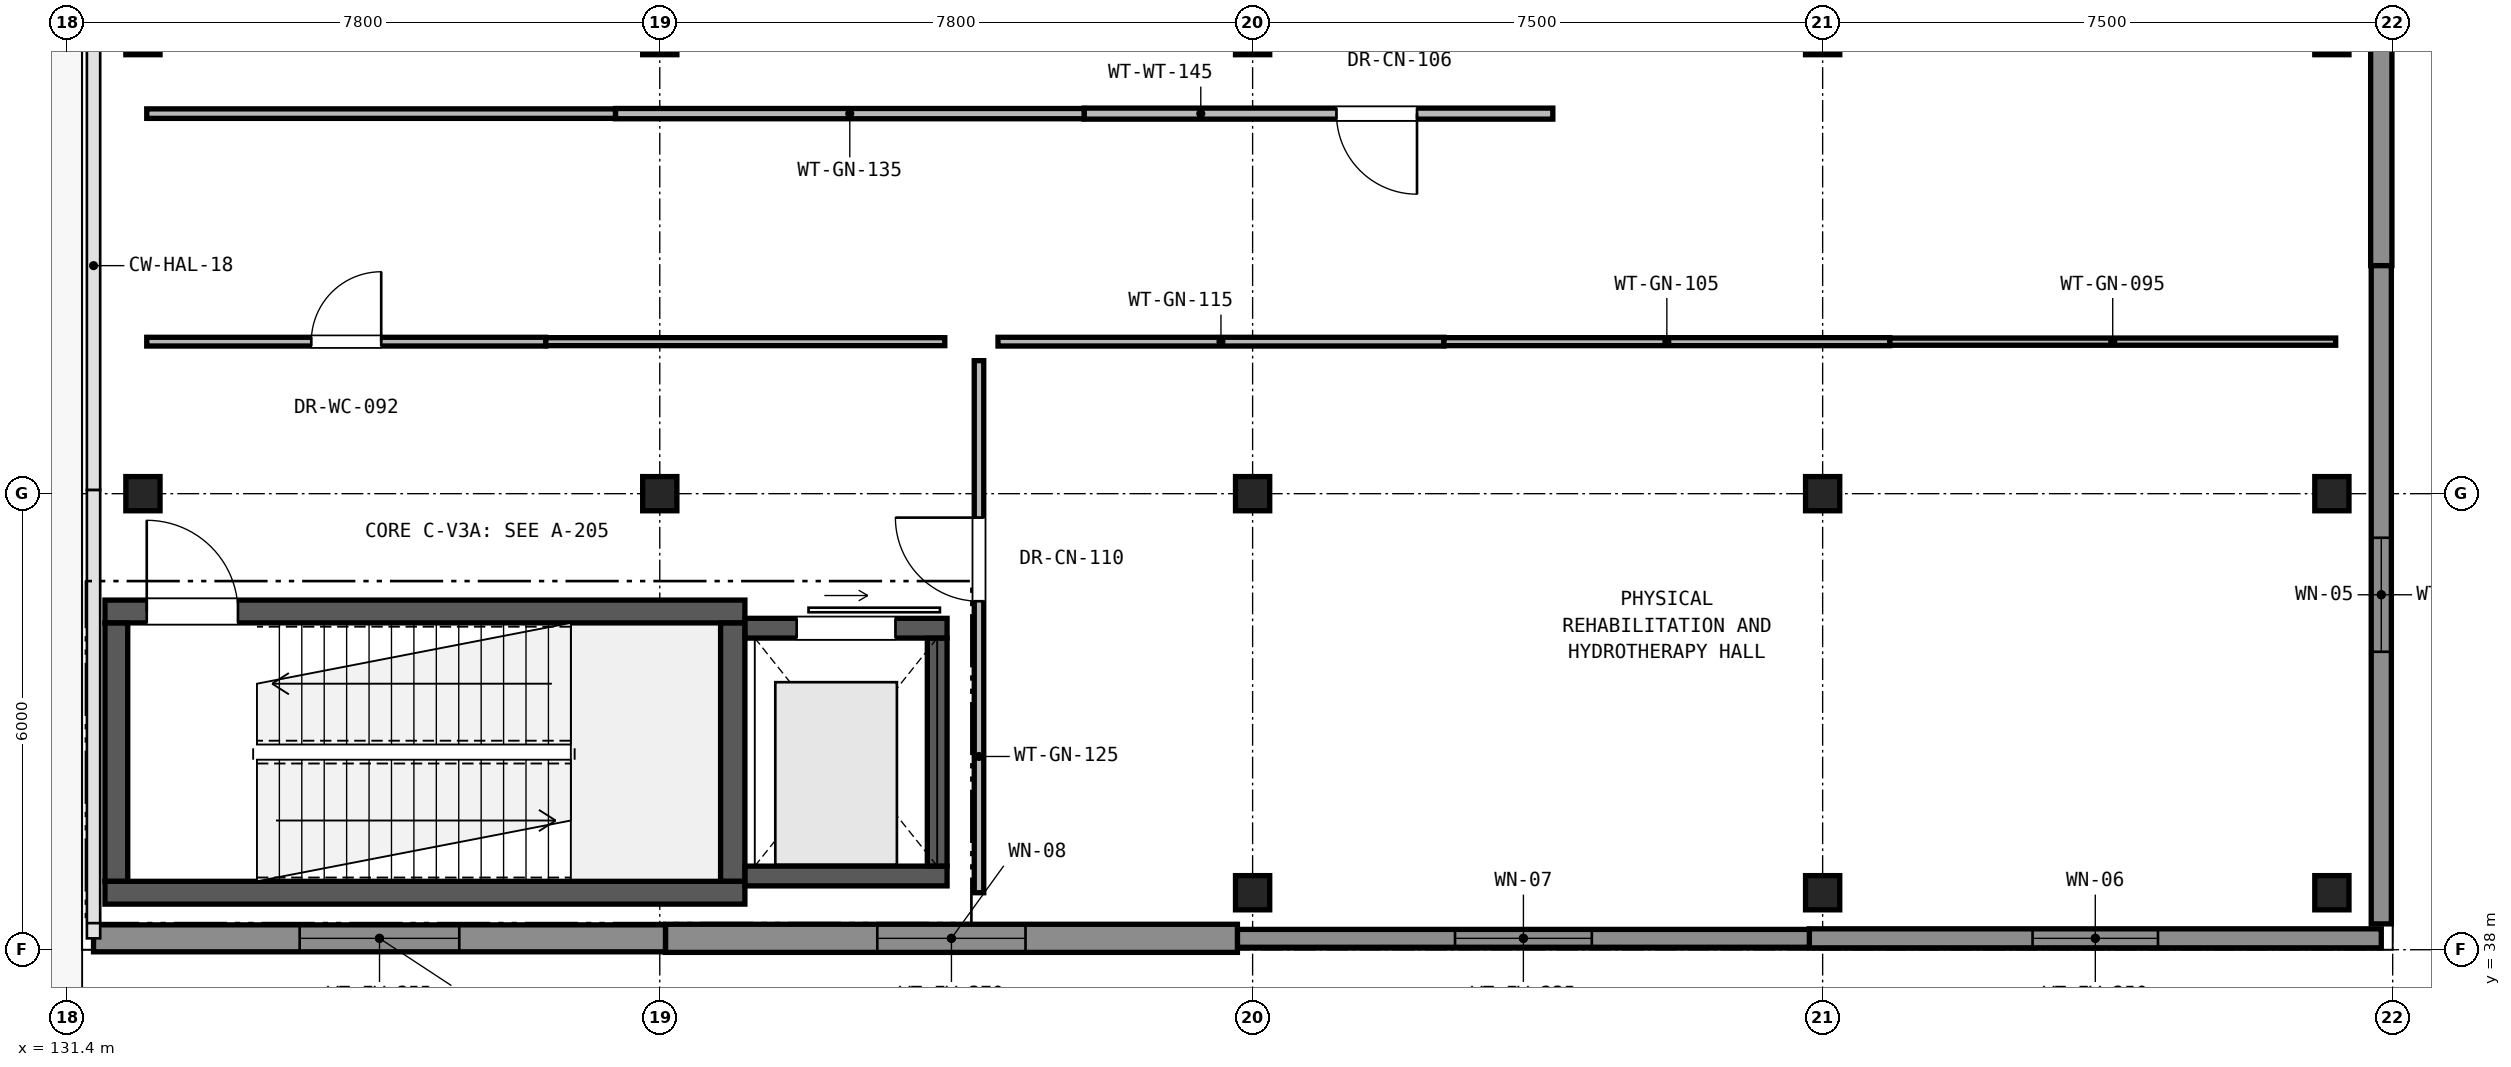
"""IFC4 building model, lengths in metres.
Left out: names, types, materials, properties, quantities, classifications, styles, units other than length and angle.
Written with IfcOpenShell. Run it as: python <this file> out.ifc"""

import sys

from ifc_helpers import new_model, si_unit, direction, frame, frame_2d, origin, origin_2d, place, context, subcontext, project, spatial, rectangle, extrude, element, fill, save


model = new_model("IFC4")
c1 = context("Model", 3, precision=1e-05, world=origin(), true_north=direction((0.0, 1.0)))
c2 = subcontext(c1, "Body", "Model", "MODEL_VIEW")
j1 = project(units=[si_unit("LENGTHUNIT", "METRE"), si_unit("PLANEANGLEUNIT", "RADIAN")], contexts=[c1])
p1 = place(None, origin())
s1 = spatial("IfcSite", under=j1, at=p1, CompositionType="ELEMENT")
p2 = place(p1, origin())
s2 = spatial("IfcBuilding", under=s1, at=p2, CompositionType="ELEMENT")
p3 = place(p2, origin())
s3 = spatial("IfcBuildingStorey", under=s2, at=p3, CompositionType="ELEMENT", Elevation=0.0)
for number, where, z_axis, x_axis in (
    (1, (132.4, 44.0, 0.0), (0.0, 0.0, 1.0), (1.0, 0.0, 0.0)),
    (2, (132.4, 50.0, 0.0), (0.0, 0.0, 1.0), (1.0, 0.0, 0.0)),
    (3, (139.2, 44.0, 0.0), (0.0, 0.0, 1.0), (1.0, 0.0, 0.0)),
    (4, (139.2, 50.0, 0.0), (0.0, 0.0, 1.0), (1.0, 0.0, 0.0)),
    (5, (147.0, 38.75, 0.0), (0.0, 0.0, 1.0), (1.0, 0.0, 0.0)),
    (6, (147.0, 44.0, 0.0), (0.0, 0.0, 1.0), (1.0, 0.0, 0.0)),
    (7, (147.0, 50.0, 0.0), (0.0, 0.0, 1.0), (1.0, 0.0, 0.0)),
    (8, (154.5, 38.75, 0.0), (0.0, 0.0, 1.0), (1.0, 0.0, 0.0)),
    (9, (154.5, 44.0, 0.0), (0.0, 0.0, 1.0), (1.0, 0.0, 0.0)),
    (10, (154.5, 50.0, 0.0), (0.0, 0.0, 1.0), (1.0, 0.0, 0.0)),
    (11, (161.2, 38.75, 0.0), (0.0, 0.0, 1.0), (1.0, 0.0, 0.0)),
    (12, (161.2, 44.0, 0.0), (0.0, 0.0, 1.0), (1.0, 0.0, 0.0)),
    (13, (161.2, 50.0, 0.0), (0.0, 0.0, 1.0), (1.0, 0.0, 0.0)),
):
    element("IfcColumn", number, at=place(p3, frame(where, z_axis=z_axis, x_axis=x_axis)), inside=s3, PredefinedType="COLUMN", context=c2, shape_type="SweptSolid", body=[
        extrude(rectangle(XDim=0.45, YDim=0.45, at=origin_2d()), origin(), (0.0, 0.0, 1.0), 5.1),
    ])
p4 = place(p3, frame((161.85, 55.66, 0.0), z_axis=(0.0, 0.0, 1.0), x_axis=(0.0, -1.0, 0.0)))
e14 = element("IfcWall", 14, at=p4, inside=s3, PredefinedType="SOLIDWALL", context=c2, shape_type="SweptSolid", body=[
    extrude(rectangle(XDim=8.66, YDim=0.28, at=frame_2d((4.33, 0.0))), origin(), (0.0, 0.0, 1.0), 4.825),
])
p5 = place(p4, frame((3.655, 0.0, 0.9)))
e15 = element("IfcOpeningElement", 15, at=p5, cuts=e14, PredefinedType="OPENING", context=c2, shape_type="SweptSolid", body=[
    extrude(rectangle(XDim=1.35, YDim=1.5, at=frame_2d((0.675, 0.75))), frame((0.0, 0.15, 0.0), z_axis=(0.0, -1.0, 0.0), x_axis=(1.0, 0.0, 0.0)), (0.0, 0.0, 1.0), 0.3),
])
p6 = place(p3, frame((161.85, 47.0, 0.0), z_axis=(0.0, 0.0, 1.0), x_axis=(0.0, -1.0, 0.0)))
e16 = element("IfcWall", 16, at=p6, inside=s3, PredefinedType="SOLIDWALL", context=c2, shape_type="SweptSolid", body=[
    extrude(rectangle(XDim=8.66, YDim=0.265, at=frame_2d((4.33, 0.0))), origin(), (0.0, 0.0, 1.0), 4.825),
])
p7 = place(p6, frame((3.58, 0.0, 0.9)))
e17 = element("IfcOpeningElement", 17, at=p7, cuts=e16, PredefinedType="OPENING", context=c2, shape_type="SweptSolid", body=[
    extrude(rectangle(XDim=1.5, YDim=1.5, at=frame_2d((0.75, 0.75))), frame((0.0, 0.142, 0.0), z_axis=(0.0, -1.0, 0.0), x_axis=(1.0, 0.0, 0.0)), (0.0, 0.0, 1.0), 0.285),
])
p8 = place(p3, frame((161.85, 38.15, 0.0), z_axis=(0.0, 0.0, 1.0), x_axis=(-1.0, 0.0, 0.0)))
e18 = element("IfcWall", 18, at=p8, inside=s3, PredefinedType="SOLIDWALL", context=c2, shape_type="SweptSolid", body=[
    extrude(rectangle(XDim=7.525, YDim=0.25, at=frame_2d((3.763, 0.0))), origin(), (0.0, 0.0, 1.0), 4.825),
])
p9 = place(p8, frame((2.938, 0.0, 0.9)))
e19 = element("IfcOpeningElement", 19, at=p9, cuts=e18, PredefinedType="OPENING", context=c2, shape_type="SweptSolid", body=[
    extrude(rectangle(XDim=1.65, YDim=1.5, at=frame_2d((0.825, 0.75))), frame((0.0, 0.135, 0.0), z_axis=(0.0, -1.0, 0.0), x_axis=(1.0, 0.0, 0.0)), (0.0, 0.0, 1.0), 0.27),
])
p10 = place(p3, frame((154.325, 38.15, 0.0), z_axis=(0.0, 0.0, 1.0), x_axis=(-1.0, 0.0, 0.0)))
e20 = element("IfcWall", 20, at=p10, inside=s3, PredefinedType="SOLIDWALL", context=c2, shape_type="SweptSolid", body=[
    extrude(rectangle(XDim=7.525, YDim=0.235, at=frame_2d((3.762, 0.0))), origin(), (0.0, 0.0, 1.0), 4.825),
])
p11 = place(p10, frame((2.862, 0.0, 0.9)))
e21 = element("IfcOpeningElement", 21, at=p11, cuts=e20, PredefinedType="OPENING", context=c2, shape_type="SweptSolid", body=[
    extrude(rectangle(XDim=1.8, YDim=1.5, at=frame_2d((0.9, 0.75))), frame((0.0, 0.127, 0.0), z_axis=(0.0, -1.0, 0.0), x_axis=(1.0, 0.0, 0.0)), (0.0, 0.0, 1.0), 0.255),
])
p12 = place(p3, frame((146.8, 38.15, 0.0), z_axis=(0.0, 0.0, 1.0), x_axis=(-1.0, 0.0, 0.0)))
e22 = element("IfcWall", 22, at=p12, inside=s3, PredefinedType="SOLIDWALL", context=c2, shape_type="SweptSolid", body=[
    extrude(rectangle(XDim=7.525, YDim=0.37, at=frame_2d((3.763, 0.0))), origin(), (0.0, 0.0, 1.0), 4.825),
])
p13 = place(p12, frame((2.788, 0.0, 0.9)))
e23 = element("IfcOpeningElement", 23, at=p13, cuts=e22, PredefinedType="OPENING", context=c2, shape_type="SweptSolid", body=[
    extrude(rectangle(XDim=1.95, YDim=1.5, at=frame_2d((0.975, 0.75))), frame((0.0, 0.195, 0.0), z_axis=(0.0, -1.0, 0.0), x_axis=(1.0, 0.0, 0.0)), (0.0, 0.0, 1.0), 0.39),
])
p14 = place(p3, frame((139.275, 38.15, 0.0), z_axis=(0.0, 0.0, 1.0), x_axis=(-1.0, 0.0, 0.0)))
e24 = element("IfcWall", 24, at=p14, inside=s3, PredefinedType="SOLIDWALL", context=c2, shape_type="SweptSolid", body=[
    extrude(rectangle(XDim=7.525, YDim=0.355, at=frame_2d((3.762, 0.0))), origin(), (0.0, 0.0, 1.0), 4.825),
])
p15 = place(p14, frame((2.713, 0.0, 0.9)))
e25 = element("IfcOpeningElement", 25, at=p15, cuts=e24, PredefinedType="OPENING", context=c2, shape_type="SweptSolid", body=[
    extrude(rectangle(XDim=2.1, YDim=1.5, at=frame_2d((1.05, 0.75))), frame((0.0, 0.188, 0.0), z_axis=(0.0, -1.0, 0.0), x_axis=(1.0, 0.0, 0.0)), (0.0, 0.0, 1.0), 0.375),
])
p16 = place(p3, frame((131.9, 38.75, 0.0), z_axis=(0.0, 0.0, 1.0), x_axis=(1.0, 0.0, 0.0)))
e26 = element("IfcWall", 26, at=p16, inside=s3, PredefinedType="SHEAR", context=c2, shape_type="SweptSolid", body=[
    extrude(rectangle(XDim=8.42, YDim=0.3, at=frame_2d((4.21, 0.0))), origin(), (0.0, 0.0, 1.0), 4.825),
])
p17 = place(p3, frame((131.9, 42.45, 0.0), z_axis=(0.0, 0.0, 1.0), x_axis=(1.0, 0.0, 0.0)))
e27 = element("IfcWall", 27, at=p17, inside=s3, PredefinedType="SHEAR", context=c2, shape_type="SweptSolid", body=[
    extrude(rectangle(XDim=8.42, YDim=0.3, at=frame_2d((4.21, 0.0))), origin(), (0.0, 0.0, 1.0), 4.825),
])
p18 = place(p17, frame((0.55, 0.0, 0.0)))
e28 = element("IfcOpeningElement", 28, at=p18, cuts=e27, PredefinedType="OPENING", context=c2, shape_type="SweptSolid", body=[
    extrude(rectangle(XDim=1.2, YDim=2.2, at=frame_2d((0.6, 1.1))), frame((0.0, 0.16, 0.0), z_axis=(0.0, -1.0, 0.0), x_axis=(1.0, 0.0, 0.0)), (0.0, 0.0, 1.0), 0.32),
])
p19 = place(p3, frame((132.05, 38.902, 0.0), z_axis=(0.0, 0.0, 1.0), x_axis=(0.0, 1.0, 0.0)))
e29 = element("IfcWall", 29, at=p19, inside=s3, PredefinedType="SHEAR", context=c2, shape_type="SweptSolid", body=[
    extrude(rectangle(XDim=3.396, YDim=0.3, at=frame_2d((1.698, 0.0))), origin(), (0.0, 0.0, 1.0), 4.825),
])
p20 = place(p3, frame((140.16, 38.902, 0.0), z_axis=(0.0, 0.0, 1.0), x_axis=(0.0, 1.0, 0.0)))
e30 = element("IfcWall", 30, at=p20, inside=s3, PredefinedType="SHEAR", context=c2, shape_type="SweptSolid", body=[
    extrude(rectangle(XDim=3.396, YDim=0.32, at=frame_2d((1.698, 0.0))), origin(), (0.0, 0.0, 1.0), 4.825),
])
p21 = place(p3, frame((140.322, 38.97, 0.0), z_axis=(0.0, 0.0, 1.0), x_axis=(1.0, 0.0, 0.0)))
e31 = element("IfcWall", 31, at=p21, inside=s3, PredefinedType="SHEAR", context=c2, shape_type="SweptSolid", body=[
    extrude(rectangle(XDim=2.658, YDim=0.26, at=frame_2d((1.329, 0.0))), origin(), (0.0, 0.0, 1.0), 4.825),
])
p22 = place(p3, frame((140.322, 42.23, 0.0), z_axis=(0.0, 0.0, 1.0), x_axis=(1.0, 0.0, 0.0)))
e32 = element("IfcWall", 32, at=p22, inside=s3, PredefinedType="SHEAR", context=c2, shape_type="SweptSolid", body=[
    extrude(rectangle(XDim=2.658, YDim=0.26, at=frame_2d((1.329, 0.0))), origin(), (0.0, 0.0, 1.0), 4.825),
])
p23 = place(p22, frame((0.679, 0.0, 0.0)))
e33 = element("IfcOpeningElement", 33, at=p23, cuts=e32, PredefinedType="OPENING", context=c2, shape_type="SweptSolid", body=[
    extrude(rectangle(XDim=1.3, YDim=2.2, at=frame_2d((0.65, 1.1))), frame((0.0, 0.14, 0.0), z_axis=(0.0, -1.0, 0.0), x_axis=(1.0, 0.0, 0.0)), (0.0, 0.0, 1.0), 0.28),
])
p24 = place(p3, frame((142.85, 39.102, 0.0), z_axis=(0.0, 0.0, 1.0), x_axis=(0.0, 1.0, 0.0)))
e34 = element("IfcWall", 34, at=p24, inside=s3, PredefinedType="SHEAR", context=c2, shape_type="SweptSolid", body=[
    extrude(rectangle(XDim=2.996, YDim=0.26, at=frame_2d((1.498, 0.0))), origin(), (0.0, 0.0, 1.0), 4.825),
])
p25 = place(p3, frame((143.4, 38.75, 0.0), z_axis=(0.0, 0.0, 1.0), x_axis=(0.0, 1.0, 0.0)))
e35 = element("IfcWall", 35, at=p25, inside=s3, PredefinedType="PARTITIONING", context=c2, shape_type="SweptSolid", body=[
    extrude(rectangle(XDim=7.0, YDim=0.125, at=frame_2d((3.5, 0.0))), origin(), (0.0, 0.0, 1.0), 4.025),
])
p26 = place(p25, frame((3.835, 0.0, 0.0)))
e36 = element("IfcOpeningElement", 36, at=p26, cuts=e35, PredefinedType="OPENING", context=c2, shape_type="SweptSolid", body=[
    extrude(rectangle(XDim=1.1, YDim=2.2, at=frame_2d((0.55, 1.1))), frame((0.0, 0.073, 0.0), z_axis=(0.0, -1.0, 0.0), x_axis=(1.0, 0.0, 0.0)), (0.0, 0.0, 1.0), 0.145),
])
p27 = place(p3, frame((143.65, 46.0, 0.0), z_axis=(0.0, 0.0, 1.0), x_axis=(1.0, 0.0, 0.0)))
e37 = element("IfcWall", 37, at=p27, inside=s3, PredefinedType="PARTITIONING", context=c2, shape_type="SweptSolid", body=[
    extrude(rectangle(XDim=5.867, YDim=0.115, at=frame_2d((2.934, 0.0))), origin(), (0.0, 0.0, 1.0), 4.025),
])
p28 = place(p3, frame((149.517, 46.0, 0.0), z_axis=(0.0, 0.0, 1.0), x_axis=(1.0, 0.0, 0.0)))
e38 = element("IfcWall", 38, at=p28, inside=s3, PredefinedType="PARTITIONING", context=c2, shape_type="SweptSolid", body=[
    extrude(rectangle(XDim=5.866, YDim=0.105, at=frame_2d((2.933, 0.0))), origin(), (0.0, 0.0, 1.0), 4.175),
])
p29 = place(p3, frame((155.383, 46.0, 0.0), z_axis=(0.0, 0.0, 1.0), x_axis=(1.0, 0.0, 0.0)))
e39 = element("IfcWall", 39, at=p29, inside=s3, PredefinedType="PARTITIONING", context=c2, shape_type="SweptSolid", body=[
    extrude(rectangle(XDim=5.867, YDim=0.095, at=frame_2d((2.934, 0.0))), origin(), (0.0, 0.0, 1.0), 4.415),
])
p30 = place(p3, frame((150.95, 49.0, 0.0), z_axis=(0.0, 0.0, 1.0), x_axis=(-1.0, 0.0, 0.0)))
e40 = element("IfcWall", 40, at=p30, inside=s3, PredefinedType="PARTITIONING", context=c2, shape_type="SweptSolid", body=[
    extrude(rectangle(XDim=6.167, YDim=0.145, at=frame_2d((3.083, 0.0))), origin(), (0.0, 0.0, 1.0), 4.025),
])
p31 = place(p30, frame((1.787, 0.0, 0.0)))
e41 = element("IfcOpeningElement", 41, at=p31, cuts=e40, PredefinedType="OPENING", context=c2, shape_type="SweptSolid", body=[
    extrude(rectangle(XDim=1.06, YDim=2.15, at=frame_2d((0.53, 1.075))), frame((0.0, 0.083, 0.0), z_axis=(0.0, -1.0, 0.0), x_axis=(1.0, 0.0, 0.0)), (0.0, 0.0, 1.0), 0.165),
])
p32 = place(p3, frame((144.783, 49.0, 0.0), z_axis=(0.0, 0.0, 1.0), x_axis=(-1.0, 0.0, 0.0)))
e42 = element("IfcWall", 42, at=p32, inside=s3, PredefinedType="PARTITIONING", context=c2, shape_type="SweptSolid", body=[
    extrude(rectangle(XDim=6.166, YDim=0.135, at=frame_2d((3.083, 0.0))), origin(), (0.0, 0.0, 1.0), 4.175),
])
p33 = place(p3, frame((138.617, 49.0, 0.0), z_axis=(0.0, 0.0, 1.0), x_axis=(-1.0, 0.0, 0.0)))
e43 = element("IfcWall", 43, at=p33, inside=s3, PredefinedType="PARTITIONING", context=c2, shape_type="SweptSolid", body=[
    extrude(rectangle(XDim=6.167, YDim=0.125, at=frame_2d((3.083, 0.0))), origin(), (0.0, 0.0, 1.0), 4.275),
])
p34 = place(p3, frame((132.45, 46.0, 0.0), z_axis=(0.0, 0.0, 1.0), x_axis=(1.0, 0.0, 0.0)))
e44 = element("IfcWall", 44, at=p34, inside=s3, PredefinedType="PARTITIONING", context=c2, shape_type="SweptSolid", body=[
    extrude(rectangle(XDim=5.25, YDim=0.115, at=frame_2d((2.625, 0.0))), origin(), (0.0, 0.0, 1.0), 4.275),
])
p35 = place(p34, frame((2.165, 0.0, 0.0)))
e45 = element("IfcOpeningElement", 45, at=p35, cuts=e44, PredefinedType="OPENING", context=c2, shape_type="SweptSolid", body=[
    extrude(rectangle(XDim=0.92, YDim=2.12, at=frame_2d((0.46, 1.06))), frame((0.0, 0.067, 0.0), z_axis=(0.0, -1.0, 0.0), x_axis=(1.0, 0.0, 0.0)), (0.0, 0.0, 1.0), 0.135),
])
p36 = place(p3, frame((137.7, 46.0, 0.0), z_axis=(0.0, 0.0, 1.0), x_axis=(1.0, 0.0, 0.0)))
e46 = element("IfcWall", 46, at=p36, inside=s3, PredefinedType="PARTITIONING", context=c2, shape_type="SweptSolid", body=[
    extrude(rectangle(XDim=5.25, YDim=0.105, at=frame_2d((2.625, 0.0))), origin(), (0.0, 0.0, 1.0), 4.175),
])
p37 = place(p7, origin())
e47 = element("IfcWindow", 47, at=p37, inside=s3, PartitioningType="SINGLE_PANEL", PredefinedType="WINDOW", context=c2, shape_type="SweptSolid", body=[
    extrude(rectangle(XDim=1.5, YDim=1.5, at=frame_2d((0.75, 0.75))), frame((0.0, 0.03, 0.0), z_axis=(0.0, -1.0, 0.0), x_axis=(1.0, 0.0, 0.0)), (0.0, 0.0, 1.0), 0.06),
])
fill(e17, e47)
p38 = place(p9, origin())
e48 = element("IfcWindow", 48, at=p38, inside=s3, PartitioningType="SINGLE_PANEL", PredefinedType="WINDOW", context=c2, shape_type="SweptSolid", body=[
    extrude(rectangle(XDim=1.65, YDim=1.5, at=frame_2d((0.825, 0.75))), frame((0.0, 0.03, 0.0), z_axis=(0.0, -1.0, 0.0), x_axis=(1.0, 0.0, 0.0)), (0.0, 0.0, 1.0), 0.06),
])
fill(e19, e48)
p39 = place(p11, origin())
e49 = element("IfcWindow", 49, at=p39, inside=s3, PartitioningType="SINGLE_PANEL", PredefinedType="WINDOW", context=c2, shape_type="SweptSolid", body=[
    extrude(rectangle(XDim=1.8, YDim=1.5, at=frame_2d((0.9, 0.75))), frame((0.0, 0.03, 0.0), z_axis=(0.0, -1.0, 0.0), x_axis=(1.0, 0.0, 0.0)), (0.0, 0.0, 1.0), 0.06),
])
fill(e21, e49)
p40 = place(p13, origin())
e50 = element("IfcWindow", 50, at=p40, inside=s3, PartitioningType="SINGLE_PANEL", PredefinedType="WINDOW", context=c2, shape_type="SweptSolid", body=[
    extrude(rectangle(XDim=1.95, YDim=1.5, at=frame_2d((0.975, 0.75))), frame((0.0, 0.03, 0.0), z_axis=(0.0, -1.0, 0.0), x_axis=(1.0, 0.0, 0.0)), (0.0, 0.0, 1.0), 0.06),
])
fill(e23, e50)
p41 = place(p15, origin())
e51 = element("IfcWindow", 51, at=p41, inside=s3, PartitioningType="SINGLE_PANEL", PredefinedType="WINDOW", context=c2, shape_type="SweptSolid", body=[
    extrude(rectangle(XDim=2.1, YDim=1.5, at=frame_2d((1.05, 0.75))), frame((0.0, 0.03, 0.0), z_axis=(0.0, -1.0, 0.0), x_axis=(1.0, 0.0, 0.0)), (0.0, 0.0, 1.0), 0.06),
])
fill(e25, e51)
p42 = place(p18, origin())
e52 = element("IfcDoor", 52, at=p42, inside=s3, OperationType="SINGLE_SWING_LEFT", PredefinedType="DOOR", context=c2, shape_type="SweptSolid", body=[
    extrude(rectangle(XDim=1.2, YDim=2.2, at=frame_2d((0.6, 1.1))), frame((0.0, 0.025, 0.0), z_axis=(0.0, -1.0, 0.0), x_axis=(1.0, 0.0, 0.0)), (0.0, 0.0, 1.0), 0.05),
])
fill(e28, e52)
p43 = place(p23, origin())
e53 = element("IfcDoor", 53, at=p43, inside=s3, OperationType="SLIDING_TO_RIGHT", PredefinedType="DOOR", context=c2, shape_type="SweptSolid", body=[
    extrude(rectangle(XDim=1.3, YDim=2.2, at=frame_2d((0.65, 1.1))), frame((0.0, 0.025, 0.0), z_axis=(0.0, -1.0, 0.0), x_axis=(1.0, 0.0, 0.0)), (0.0, 0.0, 1.0), 0.05),
])
fill(e33, e53)
p44 = place(p26, origin())
e54 = element("IfcDoor", 54, at=p44, inside=s3, OperationType="SINGLE_SWING_RIGHT", PredefinedType="DOOR", context=c2, shape_type="SweptSolid", body=[
    extrude(rectangle(XDim=1.1, YDim=2.2, at=frame_2d((0.55, 1.1))), frame((0.0, 0.025, 0.0), z_axis=(0.0, -1.0, 0.0), x_axis=(1.0, 0.0, 0.0)), (0.0, 0.0, 1.0), 0.05),
])
fill(e36, e54)
p45 = place(p31, origin())
e55 = element("IfcDoor", 55, at=p45, inside=s3, OperationType="SINGLE_SWING_LEFT", PredefinedType="DOOR", context=c2, shape_type="SweptSolid", body=[
    extrude(rectangle(XDim=1.06, YDim=2.15, at=frame_2d((0.53, 1.075))), frame((0.0, 0.025, 0.0), z_axis=(0.0, -1.0, 0.0), x_axis=(1.0, 0.0, 0.0)), (0.0, 0.0, 1.0), 0.05),
])
fill(e41, e55)
p46 = place(p35, origin())
e56 = element("IfcDoor", 56, at=p46, inside=s3, OperationType="SINGLE_SWING_RIGHT", PredefinedType="DOOR", context=c2, shape_type="SweptSolid", body=[
    extrude(rectangle(XDim=0.92, YDim=2.12, at=frame_2d((0.46, 1.06))), frame((0.0, 0.025, 0.0), z_axis=(0.0, -1.0, 0.0), x_axis=(1.0, 0.0, 0.0)), (0.0, 0.0, 1.0), 0.05),
])
fill(e45, e56)
save(model, sys.argv[1])
